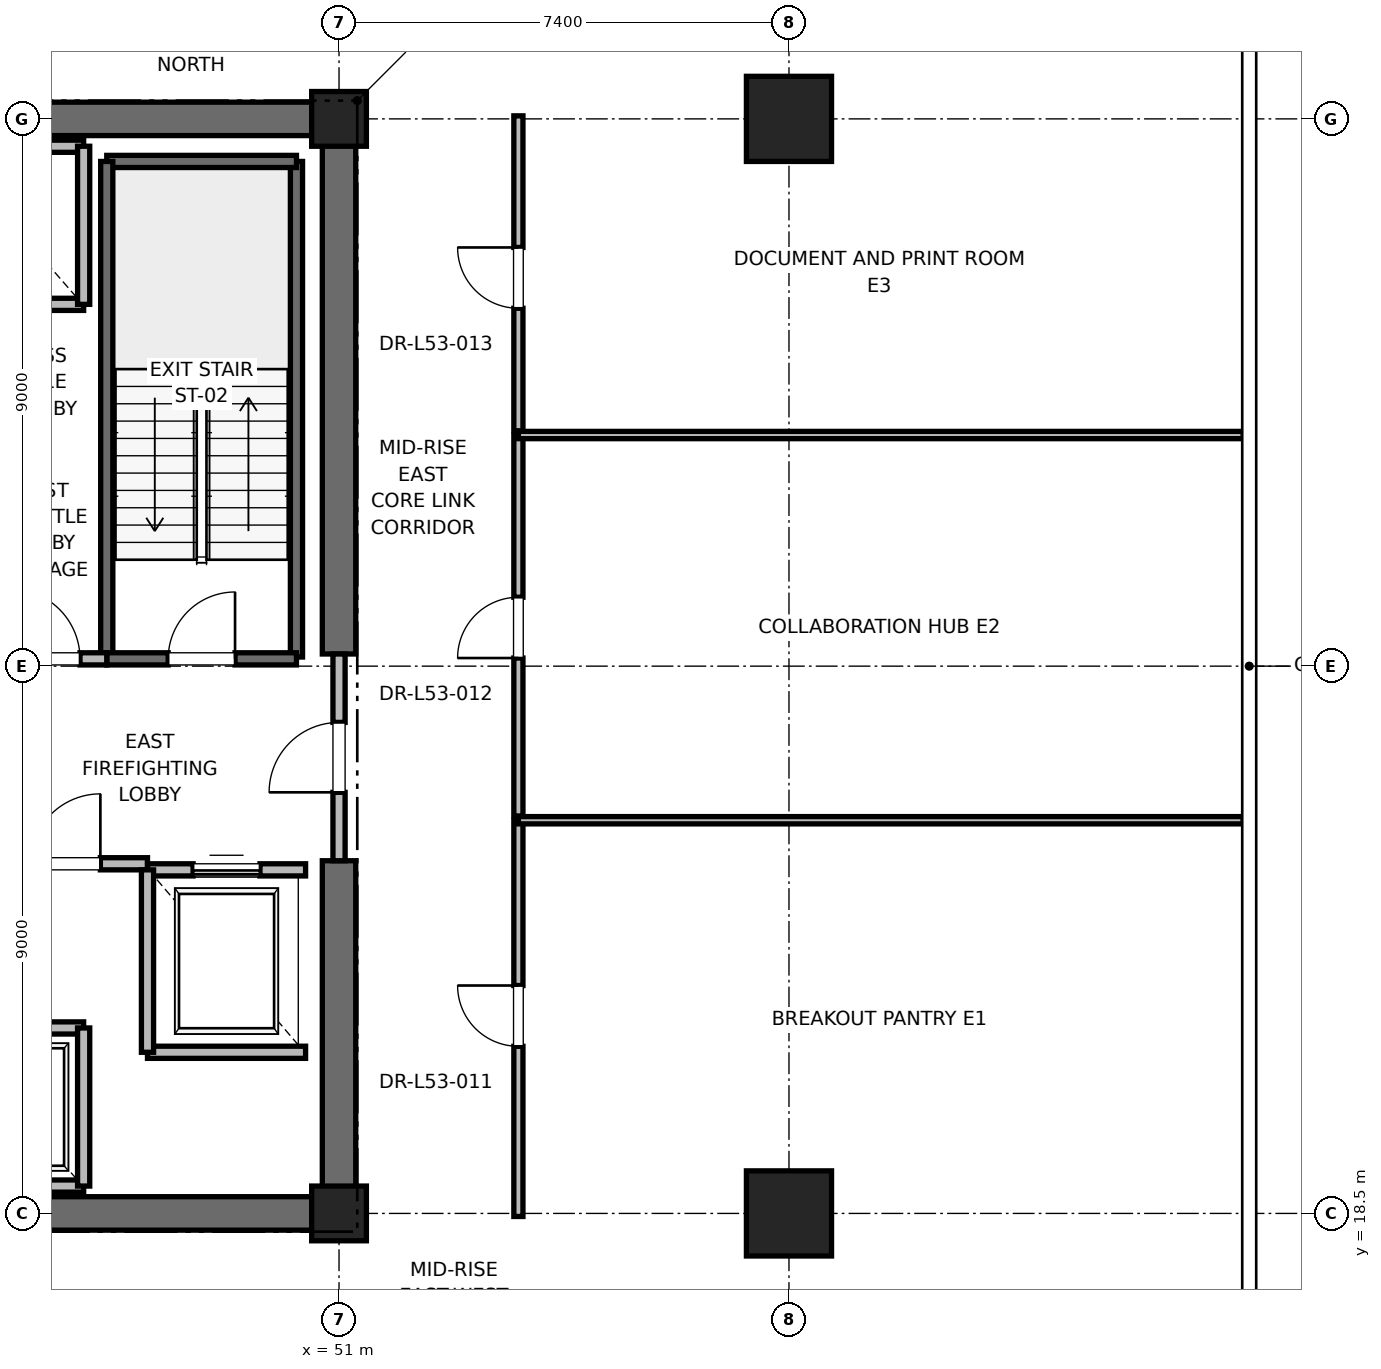
"""IFC4 building model, lengths in metres.
Left out: names, types, materials, properties, quantities, classifications, styles, units other than length and angle.
Written with IfcOpenShell. Run it as: python <this file> out.ifc"""

import sys

from ifc_helpers import new_model, si_unit, direction, frame, frame_2d, origin, origin_2d, place, context, subcontext, project, spatial, rectangle, extrude, element, fill, save


model = new_model("IFC4")
c1 = context("Model", 3, precision=1e-05, world=origin(), true_north=direction((0.0, 1.0)))
c2 = subcontext(c1, "Body", "Model", "MODEL_VIEW")
j1 = project(units=[si_unit("LENGTHUNIT", "METRE"), si_unit("PLANEANGLEUNIT", "RADIAN")], contexts=[c1])
p1 = place(None, origin())
s1 = spatial("IfcSite", under=j1, at=p1, CompositionType="ELEMENT")
p2 = place(p1, origin())
s2 = spatial("IfcBuilding", under=s1, at=p2, CompositionType="ELEMENT")
p3 = place(p2, frame((0.0, 0.0, 229.2)))
s3 = spatial("IfcBuildingStorey", under=s2, at=p3, CompositionType="ELEMENT", Elevation=229.2)
for number, where, z_axis, x_axis in (
    (1, (58.4, 18.5, 0.0), (0.0, 0.0, 1.0), (1.0, 0.0, 0.0)),
    (2, (58.4, 36.5, 0.0), (0.0, 0.0, 1.0), (1.0, 0.0, 0.0)),
):
    element("IfcColumn", number, at=place(p3, frame(where, z_axis=z_axis, x_axis=x_axis)), inside=s3, PredefinedType="COLUMN", context=c2, shape_type="SweptSolid", body=[
        extrude(rectangle(XDim=1.4, YDim=1.4, at=origin_2d()), origin(), (0.0, 0.0, 1.0), 4.0),
    ])
for number, where, z_axis, x_axis in (
    (3, (51.0, 18.5, 0.0), (0.0, 0.0, 1.0), (1.0, 0.0, 0.0)),
    (4, (51.0, 36.5, 0.0), (0.0, 0.0, 1.0), (1.0, 0.0, 0.0)),
):
    element("IfcColumn", number, at=place(p3, frame(where, z_axis=z_axis, x_axis=x_axis)), inside=s3, PredefinedType="PILASTER", context=c2, shape_type="SweptSolid", body=[
        extrude(rectangle(XDim=0.9, YDim=0.9, at=origin_2d()), origin(), (0.0, 0.0, 1.0), 4.0),
    ])
p4 = place(p3, frame((41.8, 18.5, 0.0), z_axis=(0.0, 0.0, 1.0), x_axis=(1.0, 0.0, 0.0)))
e5 = element("IfcWall", 5, at=p4, inside=s3, PredefinedType="SHEAR", context=c2, shape_type="SweptSolid", body=[
    extrude(rectangle(XDim=9.2, YDim=0.55, at=frame_2d((4.6, 0.0))), origin(), (0.0, 0.0, 1.0), 3.7),
])
for number, where, z_axis, x_axis in (
    (6, (45.2, 36.5, 0.0), (0.0, 0.0, 1.0), (1.0, 0.0, 0.0)),
    (7, (51.0, 18.5, 0.0), (0.0, 0.0, 1.0), (0.0, 1.0, 0.0)),
):
    element("IfcWall", number, at=place(p3, frame(where, z_axis=z_axis, x_axis=x_axis)), inside=s3, PredefinedType="SHEAR", context=c2, shape_type="SweptSolid", body=[
        extrude(rectangle(XDim=5.8, YDim=0.55, at=frame_2d((2.9, 0.0))), origin(), (0.0, 0.0, 1.0), 3.7),
    ])
p5 = place(p3, frame((51.0, 27.7, 0.0), z_axis=(0.0, 0.0, 1.0), x_axis=(0.0, 1.0, 0.0)))
e8 = element("IfcWall", 8, at=p5, inside=s3, PredefinedType="SHEAR", context=c2, shape_type="SweptSolid", body=[
    extrude(rectangle(XDim=8.8, YDim=0.55, at=frame_2d((4.4, 0.0))), origin(), (0.0, 0.0, 1.0), 3.7),
])
p6 = place(p3, frame((50.3, 27.65, 0.0), z_axis=(0.0, 0.0, 1.0), x_axis=(0.0, 1.0, 0.0)))
e9 = element("IfcWall", 9, at=p6, inside=s3, PredefinedType="SOLIDWALL", context=c2, shape_type="SweptSolid", body=[
    extrude(rectangle(XDim=8.15, YDim=0.2, at=frame_2d((4.075, 0.0))), origin(), (0.0, 0.0, 1.0), 3.7),
])
p7 = place(p3, frame((47.18, 35.8, 0.0), z_axis=(0.0, 0.0, 1.0), x_axis=(1.0, 0.0, 0.0)))
e10 = element("IfcWall", 10, at=p7, inside=s3, PredefinedType="SOLIDWALL", context=c2, shape_type="SweptSolid", body=[
    extrude(rectangle(XDim=3.12, YDim=0.2, at=frame_2d((1.56, 0.0))), origin(), (0.0, 0.0, 1.0), 3.7),
])
p8 = place(p3, frame((47.18, 27.62, 0.0), z_axis=(0.0, 0.0, 1.0), x_axis=(0.0, 1.0, 0.0)))
e11 = element("IfcWall", 11, at=p8, inside=s3, PredefinedType="SOLIDWALL", context=c2, shape_type="SweptSolid", body=[
    extrude(rectangle(XDim=8.18, YDim=0.2, at=frame_2d((4.09, 0.0))), origin(), (0.0, 0.0, 1.0), 3.7),
])
p9 = place(p3, frame((47.18, 27.62, 0.0), z_axis=(0.0, 0.0, 1.0), x_axis=(1.0, 0.0, 0.0)))
e12 = element("IfcWall", 12, at=p9, inside=s3, PredefinedType="SOLIDWALL", context=c2, shape_type="SweptSolid", body=[
    extrude(rectangle(XDim=3.12, YDim=0.2, at=frame_2d((1.56, 0.0))), origin(), (0.0, 0.0, 1.0), 3.7),
])
p10 = place(p9, frame((1.01, 0.0, 0.0)))
e13 = element("IfcOpeningElement", 13, at=p10, cuts=e12, PredefinedType="OPENING", context=c2, shape_type="SweptSolid", body=[
    extrude(rectangle(XDim=1.1, YDim=2.15, at=frame_2d((0.55, 1.075))), frame((0.0, 0.1, 0.0), z_axis=(0.0, -1.0, 0.0), x_axis=(1.0, 0.0, 0.0)), (0.0, 0.0, 1.0), 0.2),
])
p11 = place(p3, frame((45.15, 24.25, 0.0), z_axis=(0.0, 0.0, 1.0), x_axis=(1.0, 0.0, 0.0)))
e14 = element("IfcWall", 14, at=p11, inside=s3, PredefinedType="PARTITIONING", context=c2, shape_type="SweptSolid", body=[
    extrude(rectangle(XDim=2.7, YDim=0.2, at=frame_2d((1.35, 0.0))), origin(), (0.0, 0.0, 1.0), 3.7),
])
p12 = place(p11, frame((0.775, 0.0, 0.0)))
e15 = element("IfcOpeningElement", 15, at=p12, cuts=e14, PredefinedType="OPENING", context=c2, shape_type="SweptSolid", body=[
    extrude(rectangle(XDim=1.15, YDim=2.2, at=frame_2d((0.575, 1.1))), frame((0.0, 0.1, 0.0), z_axis=(0.0, -1.0, 0.0), x_axis=(1.0, 0.0, 0.0)), (0.0, 0.0, 1.0), 0.2),
])
p13 = place(p3, frame((45.15, 27.62, 0.0), z_axis=(0.0, 0.0, 1.0), x_axis=(1.0, 0.0, 0.0)))
e16 = element("IfcWall", 16, at=p13, inside=s3, PredefinedType="PARTITIONING", context=c2, shape_type="SweptSolid", body=[
    extrude(rectangle(XDim=2.03, YDim=0.2, at=frame_2d((1.015, 0.0))), origin(), (0.0, 0.0, 1.0), 3.7),
])
p14 = place(p13, frame((0.44, 0.0, 0.0)))
e17 = element("IfcOpeningElement", 17, at=p14, cuts=e16, PredefinedType="OPENING", context=c2, shape_type="SweptSolid", body=[
    extrude(rectangle(XDim=1.15, YDim=2.2, at=frame_2d((0.575, 1.1))), frame((0.0, 0.1, 0.0), z_axis=(0.0, -1.0, 0.0), x_axis=(1.0, 0.0, 0.0)), (0.0, 0.0, 1.0), 0.2),
])
p15 = place(p3, frame((51.0, 24.3, 0.0), z_axis=(0.0, 0.0, 1.0), x_axis=(0.0, 1.0, 0.0)))
e18 = element("IfcWall", 18, at=p15, inside=s3, PredefinedType="PARTITIONING", context=c2, shape_type="SweptSolid", body=[
    extrude(rectangle(XDim=3.4, YDim=0.2, at=frame_2d((1.7, 0.0))), origin(), (0.0, 0.0, 1.0), 2.68),
])
p16 = place(p15, frame((1.125, 0.0, 0.0)))
e19 = element("IfcOpeningElement", 19, at=p16, cuts=e18, PredefinedType="OPENING", context=c2, shape_type="SweptSolid", body=[
    extrude(rectangle(XDim=1.15, YDim=2.2, at=frame_2d((0.575, 1.1))), frame((0.0, 0.1, 0.0), z_axis=(0.0, -1.0, 0.0), x_axis=(1.0, 0.0, 0.0)), (0.0, 0.0, 1.0), 0.2),
])
p17 = place(p3, frame((47.85, 21.15, 0.0), z_axis=(0.0, 0.0, 1.0), x_axis=(1.0, 0.0, 0.0)))
e20 = element("IfcWall", 20, at=p17, inside=s3, PredefinedType="SOLIDWALL", context=c2, shape_type="SweptSolid", body=[
    extrude(rectangle(XDim=2.6, YDim=0.2, at=frame_2d((1.3, 0.0))), origin(), (0.0, 0.0, 1.0), 3.7),
])
p18 = place(p3, frame((50.45, 24.15, 0.0), z_axis=(0.0, 0.0, 1.0), x_axis=(-1.0, 0.0, 0.0)))
e21 = element("IfcWall", 21, at=p18, inside=s3, PredefinedType="SOLIDWALL", context=c2, shape_type="SweptSolid", body=[
    extrude(rectangle(XDim=2.6, YDim=0.2, at=frame_2d((1.3, 0.0))), origin(), (0.0, 0.0, 1.0), 2.68),
])
p19 = place(p18, frame((0.75, 0.0, 0.0)))
e22 = element("IfcOpeningElement", 22, at=p19, cuts=e21, PredefinedType="OPENING", context=c2, shape_type="SweptSolid", body=[
    extrude(rectangle(XDim=1.1, YDim=2.2, at=frame_2d((0.55, 1.1))), frame((0.0, 0.1, 0.0), z_axis=(0.0, -1.0, 0.0), x_axis=(1.0, 0.0, 0.0)), (0.0, 0.0, 1.0), 0.2),
])
p20 = place(p3, frame((47.85, 24.15, 0.0), z_axis=(0.0, 0.0, 1.0), x_axis=(0.0, -1.0, 0.0)))
e23 = element("IfcWall", 23, at=p20, inside=s3, PredefinedType="SOLIDWALL", context=c2, shape_type="SweptSolid", body=[
    extrude(rectangle(XDim=3.0, YDim=0.2, at=frame_2d((1.5, 0.0))), origin(), (0.0, 0.0, 1.0), 3.7),
])
p21 = place(p3, frame((44.5, 18.95, 0.0), z_axis=(0.0, 0.0, 1.0), x_axis=(1.0, 0.0, 0.0)))
e24 = element("IfcWall", 24, at=p21, inside=s3, PredefinedType="SOLIDWALL", context=c2, shape_type="SweptSolid", body=[
    extrude(rectangle(XDim=2.3, YDim=0.2, at=frame_2d((1.15, 0.0))), origin(), (0.0, 0.0, 1.0), 3.7),
])
p22 = place(p3, frame((46.8, 21.55, 0.0), z_axis=(0.0, 0.0, 1.0), x_axis=(-1.0, 0.0, 0.0)))
e25 = element("IfcWall", 25, at=p22, inside=s3, PredefinedType="SOLIDWALL", context=c2, shape_type="SweptSolid", body=[
    extrude(rectangle(XDim=2.3, YDim=0.2, at=frame_2d((1.15, 0.0))), origin(), (0.0, 0.0, 1.0), 3.7),
])
p23 = place(p22, frame((0.6, 0.0, 0.0)))
e26 = element("IfcOpeningElement", 26, at=p23, cuts=e25, PredefinedType="OPENING", context=c2, shape_type="SweptSolid", body=[
    extrude(rectangle(XDim=1.1, YDim=2.2, at=frame_2d((0.55, 1.1))), frame((0.0, 0.1, 0.0), z_axis=(0.0, -1.0, 0.0), x_axis=(1.0, 0.0, 0.0)), (0.0, 0.0, 1.0), 0.2),
])
p24 = place(p3, frame((46.8, 18.95, 0.0), z_axis=(0.0, 0.0, 1.0), x_axis=(0.0, 1.0, 0.0)))
e27 = element("IfcWall", 27, at=p24, inside=s3, PredefinedType="SOLIDWALL", context=c2, shape_type="SweptSolid", body=[
    extrude(rectangle(XDim=2.6, YDim=0.2, at=frame_2d((1.3, 0.0))), origin(), (0.0, 0.0, 1.0), 3.7),
])
p25 = place(p3, frame((44.5, 33.45, 0.0), z_axis=(0.0, 0.0, 1.0), x_axis=(1.0, 0.0, 0.0)))
e28 = element("IfcWall", 28, at=p25, inside=s3, PredefinedType="SOLIDWALL", context=c2, shape_type="SweptSolid", body=[
    extrude(rectangle(XDim=2.3, YDim=0.2, at=frame_2d((1.15, 0.0))), origin(), (0.0, 0.0, 1.0), 3.7),
])
p26 = place(p3, frame((46.8, 36.05, 0.0), z_axis=(0.0, 0.0, 1.0), x_axis=(-1.0, 0.0, 0.0)))
e29 = element("IfcWall", 29, at=p26, inside=s3, PredefinedType="SOLIDWALL", context=c2, shape_type="SweptSolid", body=[
    extrude(rectangle(XDim=2.3, YDim=0.2, at=frame_2d((1.15, 0.0))), origin(), (0.0, 0.0, 1.0), 2.68),
])
p27 = place(p3, frame((46.8, 33.45, 0.0), z_axis=(0.0, 0.0, 1.0), x_axis=(0.0, 1.0, 0.0)))
e30 = element("IfcWall", 30, at=p27, inside=s3, PredefinedType="SOLIDWALL", context=c2, shape_type="SweptSolid", body=[
    extrude(rectangle(XDim=2.6, YDim=0.2, at=frame_2d((1.3, 0.0))), origin(), (0.0, 0.0, 1.0), 3.7),
])
p28 = place(p3, frame((53.95, 18.45, 0.0), z_axis=(0.0, 0.0, 1.0), x_axis=(0.0, 1.0, 0.0)))
e31 = element("IfcWall", 31, at=p28, inside=s3, PredefinedType="PARTITIONING", context=c2, shape_type="SweptSolid", body=[
    extrude(rectangle(XDim=6.516, YDim=0.15, at=frame_2d((3.258, 0.0))), origin(), (0.0, 0.0, 1.0), 2.85),
])
p29 = place(p28, frame((2.798, 0.0, 0.0)))
e32 = element("IfcOpeningElement", 32, at=p29, cuts=e31, PredefinedType="OPENING", context=c2, shape_type="SweptSolid", body=[
    extrude(rectangle(XDim=1.0, YDim=2.15, at=frame_2d((0.5, 1.075))), frame((0.0, 0.075, 0.0), z_axis=(0.0, -1.0, 0.0), x_axis=(1.0, 0.0, 0.0)), (0.0, 0.0, 1.0), 0.15),
])
p30 = place(p3, frame((53.95, 24.966, 0.0), z_axis=(0.0, 0.0, 1.0), x_axis=(1.0, 0.0, 0.0)))
e33 = element("IfcWall", 33, at=p30, inside=s3, PredefinedType="PARTITIONING", context=c2, shape_type="SweptSolid", body=[
    extrude(rectangle(XDim=11.919, YDim=0.12, at=frame_2d((5.96, 0.0))), origin(), (0.0, 0.0, 1.0), 2.85),
])
p31 = place(p3, frame((53.95, 25.036, 0.0), z_axis=(0.0, 0.0, 1.0), x_axis=(0.0, 1.0, 0.0)))
e34 = element("IfcWall", 34, at=p31, inside=s3, PredefinedType="PARTITIONING", context=c2, shape_type="SweptSolid", body=[
    extrude(rectangle(XDim=6.265, YDim=0.15, at=frame_2d((3.133, 0.0))), origin(), (0.0, 0.0, 1.0), 2.85),
])
p32 = place(p31, frame((2.597, 0.0, 0.0)))
e35 = element("IfcOpeningElement", 35, at=p32, cuts=e34, PredefinedType="OPENING", context=c2, shape_type="SweptSolid", body=[
    extrude(rectangle(XDim=1.0, YDim=2.15, at=frame_2d((0.5, 1.075))), frame((0.0, 0.075, 0.0), z_axis=(0.0, -1.0, 0.0), x_axis=(1.0, 0.0, 0.0)), (0.0, 0.0, 1.0), 0.15),
])
p33 = place(p3, frame((53.95, 31.301, 0.0), z_axis=(0.0, 0.0, 1.0), x_axis=(1.0, 0.0, 0.0)))
e36 = element("IfcWall", 36, at=p33, inside=s3, PredefinedType="PARTITIONING", context=c2, shape_type="SweptSolid", body=[
    extrude(rectangle(XDim=11.919, YDim=0.12, at=frame_2d((5.96, 0.0))), origin(), (0.0, 0.0, 1.0), 2.85),
])
p34 = place(p3, frame((53.95, 31.371, 0.0), z_axis=(0.0, 0.0, 1.0), x_axis=(0.0, 1.0, 0.0)))
e37 = element("IfcWall", 37, at=p34, inside=s3, PredefinedType="PARTITIONING", context=c2, shape_type="SweptSolid", body=[
    extrude(rectangle(XDim=5.179, YDim=0.15, at=frame_2d((2.589, 0.0))), origin(), (0.0, 0.0, 1.0), 2.85),
])
p35 = place(p34, frame((2.014, 0.0, 0.0)))
e38 = element("IfcOpeningElement", 38, at=p35, cuts=e37, PredefinedType="OPENING", context=c2, shape_type="SweptSolid", body=[
    extrude(rectangle(XDim=1.0, YDim=2.15, at=frame_2d((0.5, 1.075))), frame((0.0, 0.075, 0.0), z_axis=(0.0, -1.0, 0.0), x_axis=(1.0, 0.0, 0.0)), (0.0, 0.0, 1.0), 0.15),
])
p36 = place(p10, origin())
e39 = element("IfcDoor", 39, at=p36, inside=s3, OperationType="SINGLE_SWING_RIGHT", PredefinedType="DOOR", context=c2, shape_type="SweptSolid", body=[
    extrude(rectangle(XDim=1.1, YDim=2.15, at=frame_2d((0.55, 1.075))), frame((0.0, 0.025, 0.0), z_axis=(0.0, -1.0, 0.0), x_axis=(1.0, 0.0, 0.0)), (0.0, 0.0, 1.0), 0.05),
])
fill(e13, e39)
p37 = place(p12, origin())
e40 = element("IfcDoor", 40, at=p37, inside=s3, OperationType="SINGLE_SWING_RIGHT", PredefinedType="DOOR", context=c2, shape_type="SweptSolid", body=[
    extrude(rectangle(XDim=1.15, YDim=2.2, at=frame_2d((0.575, 1.1))), frame((0.0, 0.025, 0.0), z_axis=(0.0, -1.0, 0.0), x_axis=(1.0, 0.0, 0.0)), (0.0, 0.0, 1.0), 0.05),
])
fill(e15, e40)
p38 = place(p14, origin())
e41 = element("IfcDoor", 41, at=p38, inside=s3, OperationType="SINGLE_SWING_LEFT", PredefinedType="DOOR", context=c2, shape_type="SweptSolid", body=[
    extrude(rectangle(XDim=1.15, YDim=2.2, at=frame_2d((0.575, 1.1))), frame((0.0, 0.025, 0.0), z_axis=(0.0, -1.0, 0.0), x_axis=(1.0, 0.0, 0.0)), (0.0, 0.0, 1.0), 0.05),
])
fill(e17, e41)
p39 = place(p16, origin())
e42 = element("IfcDoor", 42, at=p39, inside=s3, OperationType="SINGLE_SWING_LEFT", PredefinedType="DOOR", context=c2, shape_type="SweptSolid", body=[
    extrude(rectangle(XDim=1.15, YDim=2.2, at=frame_2d((0.575, 1.1))), frame((0.0, 0.025, 0.0), z_axis=(0.0, -1.0, 0.0), x_axis=(1.0, 0.0, 0.0)), (0.0, 0.0, 1.0), 0.05),
])
fill(e19, e42)
p40 = place(p19, origin())
e43 = element("IfcDoor", 43, at=p40, inside=s3, OperationType="SLIDING_TO_RIGHT", PredefinedType="DOOR", context=c2, shape_type="SweptSolid", body=[
    extrude(rectangle(XDim=1.1, YDim=2.2, at=frame_2d((0.55, 1.1))), frame((0.0, 0.025, 0.0), z_axis=(0.0, -1.0, 0.0), x_axis=(1.0, 0.0, 0.0)), (0.0, 0.0, 1.0), 0.05),
])
fill(e22, e43)
p41 = place(p29, origin())
e44 = element("IfcDoor", 44, at=p41, inside=s3, OperationType="SINGLE_SWING_RIGHT", PredefinedType="DOOR", context=c2, shape_type="SweptSolid", body=[
    extrude(rectangle(XDim=1.0, YDim=2.15, at=frame_2d((0.5, 1.075))), frame((0.0, 0.025, 0.0), z_axis=(0.0, -1.0, 0.0), x_axis=(1.0, 0.0, 0.0)), (0.0, 0.0, 1.0), 0.05),
])
fill(e32, e44)
p42 = place(p32, origin())
e45 = element("IfcDoor", 45, at=p42, inside=s3, OperationType="SINGLE_SWING_LEFT", PredefinedType="DOOR", context=c2, shape_type="SweptSolid", body=[
    extrude(rectangle(XDim=1.0, YDim=2.15, at=frame_2d((0.5, 1.075))), frame((0.0, 0.025, 0.0), z_axis=(0.0, -1.0, 0.0), x_axis=(1.0, 0.0, 0.0)), (0.0, 0.0, 1.0), 0.05),
])
fill(e35, e45)
p43 = place(p35, origin())
e46 = element("IfcDoor", 46, at=p43, inside=s3, OperationType="SINGLE_SWING_RIGHT", PredefinedType="DOOR", context=c2, shape_type="SweptSolid", body=[
    extrude(rectangle(XDim=1.0, YDim=2.15, at=frame_2d((0.5, 1.075))), frame((0.0, 0.025, 0.0), z_axis=(0.0, -1.0, 0.0), x_axis=(1.0, 0.0, 0.0)), (0.0, 0.0, 1.0), 0.05),
])
fill(e38, e46)
save(model, sys.argv[1])
